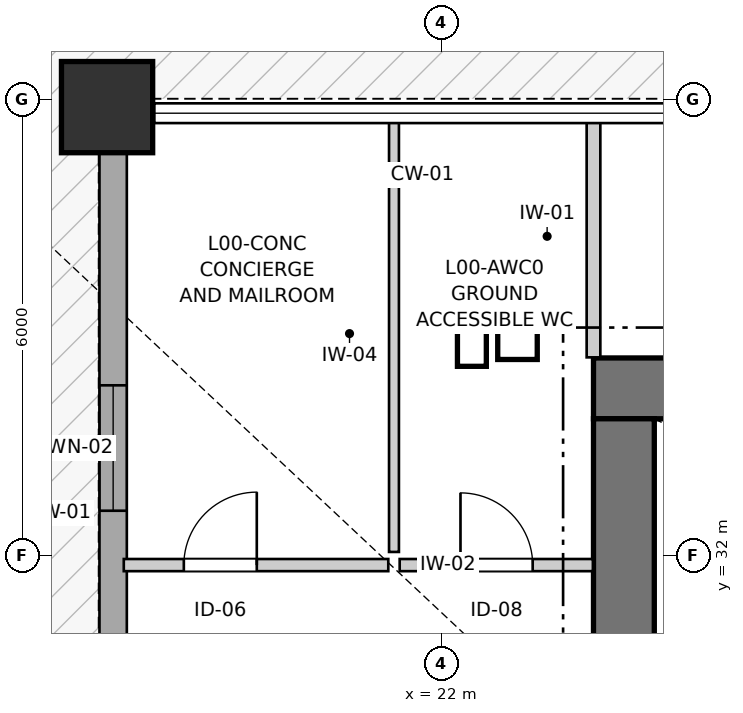
"""IFC4 building model, lengths in metres.
Left out: names, types, materials, properties, quantities, classifications, styles, units other than length and angle.
Written with IfcOpenShell. Run it as: python <this file> out.ifc"""

import sys

from ifc_helpers import new_model, si_unit, direction, frame, frame_2d, origin, origin_2d, place, context, subcontext, project, spatial, rectangle, extrude, source, transform, mapped, element, fill, save


model = new_model("IFC4")
c1 = context("Model", 3, precision=1e-05, world=origin(), true_north=direction((0.0, 1.0)))
c2 = subcontext(c1, "Body", "Model", "MODEL_VIEW")
j1 = project(units=[si_unit("LENGTHUNIT", "METRE"), si_unit("PLANEANGLEUNIT", "RADIAN")], contexts=[c1])
p1 = place(None, origin())
s1 = spatial("IfcSite", under=j1, at=p1, CompositionType="ELEMENT")
p2 = place(p1, origin())
s2 = spatial("IfcBuilding", under=s1, at=p2, CompositionType="ELEMENT")
p3 = place(p2, origin())
s3 = spatial("IfcBuildingStorey", under=s2, at=p3, CompositionType="ELEMENT", Elevation=0.0)
m1 = source(origin(), c2, "Body", "SweptSolid", [
    extrude(rectangle(XDim=1.2, YDim=1.2, at=origin_2d()), origin(), (0.0, 0.0, 1.0), 7.54),
])
p4 = place(p3, frame((17.6, 37.9, 0.0), z_axis=(0.0, 0.0, 1.0), x_axis=(1.0, 0.0, 0.0)))
e1 = element("IfcColumn", 1, at=p4, inside=s3, PredefinedType="COLUMN", context=c2, shape_type="MappedRepresentation", body=[
    mapped(m1, transform((0.0, 0.0, 0.0), x_axis=(1.0, 0.0, 0.0), y_axis=(0.0, 1.0, 0.0), z_axis=(0.0, 0.0, 1.0), scale=1.0)),
])
p5 = place(p3, frame((36.7, 34.2, 0.0), z_axis=(0.0, 0.0, 1.0), x_axis=(-1.0, 0.0, 0.0)))
e2 = element("IfcWall", 2, at=p5, inside=s3, PredefinedType="SHEAR", context=c2, shape_type="SweptSolid", body=[
    extrude(rectangle(XDim=12.7, YDim=0.8, at=frame_2d((6.35, 0.0))), origin(), (0.0, 0.0, 1.0), 7.54),
])
p6 = place(p5, frame((4.72, 0.0, 0.0)))
e3 = element("IfcOpeningElement", 3, at=p6, cuts=e2, PredefinedType="OPENING", context=c2, shape_type="SweptSolid", body=[
    extrude(rectangle(XDim=0.98, YDim=2.15, at=frame_2d((0.49, 1.075))), frame((0.0, 0.41, 0.0), z_axis=(0.0, -1.0, 0.0), x_axis=(1.0, 0.0, 0.0)), (0.0, 0.0, 1.0), 0.82),
])
p7 = place(p3, frame((24.4, 33.8, 0.0), z_axis=(0.0, 0.0, 1.0), x_axis=(0.0, -1.0, 0.0)))
e4 = element("IfcWall", 4, at=p7, inside=s3, PredefinedType="SHEAR", context=c2, shape_type="SweptSolid", body=[
    extrude(rectangle(XDim=15.6, YDim=0.8, at=frame_2d((7.8, 0.0))), origin(), (0.0, 0.0, 1.0), 7.54),
])
p8 = place(p7, frame((7.05, 0.0, 0.0)))
e5 = element("IfcOpeningElement", 5, at=p8, cuts=e4, PredefinedType="OPENING", context=c2, shape_type="SweptSolid", body=[
    extrude(rectangle(XDim=1.5, YDim=2.15, at=frame_2d((0.75, 1.075))), frame((0.0, 0.41, 0.0), z_axis=(0.0, -1.0, 0.0), x_axis=(1.0, 0.0, 0.0)), (0.0, 0.0, 1.0), 0.82),
])
p9 = place(p7, frame((3.52, 0.0, 0.0)))
e6 = element("IfcOpeningElement", 6, at=p9, cuts=e4, PredefinedType="OPENING", context=c2, shape_type="SweptSolid", body=[
    extrude(rectangle(XDim=0.86, YDim=2.05, at=frame_2d((0.43, 1.025))), frame((0.0, 0.41, 0.0), z_axis=(0.0, -1.0, 0.0), x_axis=(1.0, 0.0, 0.0)), (0.0, 0.0, 1.0), 0.82),
])
p10 = place(p7, frame((11.22, 0.0, 0.0)))
e7 = element("IfcOpeningElement", 7, at=p10, cuts=e4, PredefinedType="OPENING", context=c2, shape_type="SweptSolid", body=[
    extrude(rectangle(XDim=0.86, YDim=2.05, at=frame_2d((0.43, 1.025))), frame((0.0, 0.41, 0.0), z_axis=(0.0, -1.0, 0.0), x_axis=(1.0, 0.0, 0.0)), (0.0, 0.0, 1.0), 0.82),
])
p11 = place(p3, frame((17.68, 27.79, 0.0), z_axis=(0.0, 0.0, 1.0), x_axis=(0.0, 1.0, 0.0)))
e8 = element("IfcWall", 8, at=p11, inside=s3, PredefinedType="SOLIDWALL", context=c2, shape_type="SweptSolid", body=[
    extrude(rectangle(XDim=9.53, YDim=0.36, at=frame_2d((4.765, 0.0))), origin(), (0.0, 0.0, 1.0), 6.02),
])
p12 = place(p11, frame((4.8, 0.0, 1.0)))
e9 = element("IfcOpeningElement", 9, at=p12, cuts=e8, PredefinedType="OPENING", context=c2, shape_type="SweptSolid", body=[
    extrude(rectangle(XDim=1.65, YDim=1.45, at=frame_2d((0.825, 0.725))), frame((0.0, 0.19, 0.0), z_axis=(0.0, -1.0, 0.0), x_axis=(1.0, 0.0, 0.0)), (0.0, 0.0, 1.0), 0.38),
])
p13 = place(p3, frame((24.0, 34.608, 0.0), z_axis=(0.0, 0.0, 1.0), x_axis=(0.0, 1.0, 0.0)))
e10 = element("IfcWall", 10, at=p13, inside=s3, PredefinedType="PARTITIONING", context=c2, shape_type="SweptSolid", body=[
    extrude(rectangle(XDim=3.185, YDim=0.18, at=frame_2d((1.593, 0.0))), origin(), (0.0, 0.0, 1.0), 7.54),
])
p14 = place(p3, frame((17.82, 31.875, 0.0), z_axis=(0.0, 0.0, 1.0), x_axis=(1.0, 0.0, 0.0)))
e11 = element("IfcWall", 11, at=p14, inside=s3, PredefinedType="PARTITIONING", context=c2, shape_type="SweptSolid", body=[
    extrude(rectangle(XDim=3.48, YDim=0.16, at=frame_2d((1.74, 0.0))), origin(), (0.0, 0.0, 1.0), 7.54),
])
p15 = place(p14, frame((0.79, 0.0, 0.0)))
e12 = element("IfcOpeningElement", 12, at=p15, cuts=e11, PredefinedType="OPENING", context=c2, shape_type="SweptSolid", body=[
    extrude(rectangle(XDim=0.96, YDim=2.1, at=frame_2d((0.48, 1.05))), frame((0.0, 0.09, 0.0), z_axis=(0.0, -1.0, 0.0), x_axis=(1.0, 0.0, 0.0)), (0.0, 0.0, 1.0), 0.18),
])
p16 = place(p3, frame((21.45, 31.875, 0.0), z_axis=(0.0, 0.0, 1.0), x_axis=(1.0, 0.0, 0.0)))
e13 = element("IfcWall", 13, at=p16, inside=s3, PredefinedType="PARTITIONING", context=c2, shape_type="SweptSolid", body=[
    extrude(rectangle(XDim=2.542, YDim=0.16, at=frame_2d((1.271, 0.0))), origin(), (0.0, 0.0, 1.0), 7.54),
])
p17 = place(p16, frame((0.8, 0.0, 0.0)))
e14 = element("IfcOpeningElement", 14, at=p17, cuts=e13, PredefinedType="OPENING", context=c2, shape_type="SweptSolid", body=[
    extrude(rectangle(XDim=0.95, YDim=2.1, at=frame_2d((0.475, 1.05))), frame((0.0, 0.09, 0.0), z_axis=(0.0, -1.0, 0.0), x_axis=(1.0, 0.0, 0.0)), (0.0, 0.0, 1.0), 0.18),
])
p18 = place(p3, frame((21.375, 32.048, 0.0), z_axis=(0.0, 0.0, 1.0), x_axis=(0.0, 1.0, 0.0)))
e15 = element("IfcWall", 15, at=p18, inside=s3, PredefinedType="PARTITIONING", context=c2, shape_type="SweptSolid", body=[
    extrude(rectangle(XDim=5.745, YDim=0.13, at=frame_2d((2.873, 0.0))), origin(), (0.0, 0.0, 1.0), 7.54),
])
m2 = source(origin(), c2, "Body", "SweptSolid", [
    extrude(rectangle(XDim=1.65, YDim=1.45, at=frame_2d((0.825, 0.725))), frame((0.0, 0.03, 0.0), z_axis=(0.0, -1.0, 0.0), x_axis=(1.0, 0.0, 0.0)), (0.0, 0.0, 1.0), 0.06),
])
p19 = place(p12, origin())
e16 = element("IfcWindow", 16, at=p19, inside=s3, PartitioningType="SINGLE_PANEL", PredefinedType="WINDOW", context=c2, shape_type="MappedRepresentation", body=[
    mapped(m2, transform((0.0, 0.0, 0.0), x_axis=(1.0, 0.0, 0.0), y_axis=(0.0, 1.0, 0.0), z_axis=(0.0, 0.0, 1.0), scale=1.0)),
])
fill(e9, e16)
m3 = source(origin(), c2, "Body", "SweptSolid", [
    extrude(rectangle(XDim=0.96, YDim=2.1, at=frame_2d((0.48, 1.05))), frame((0.0, 0.025, 0.0), z_axis=(0.0, -1.0, 0.0), x_axis=(1.0, 0.0, 0.0)), (0.0, 0.0, 1.0), 0.05),
])
p20 = place(p15, origin())
e17 = element("IfcDoor", 17, at=p20, inside=s3, OperationType="SINGLE_SWING_RIGHT", PredefinedType="DOOR", context=c2, shape_type="MappedRepresentation", body=[
    mapped(m3, transform((0.0, 0.0, 0.0), x_axis=(1.0, 0.0, 0.0), y_axis=(0.0, 1.0, 0.0), z_axis=(0.0, 0.0, 1.0), scale=1.0)),
])
fill(e12, e17)
m4 = source(origin(), c2, "Body", "SweptSolid", [
    extrude(rectangle(XDim=0.95, YDim=2.1, at=frame_2d((0.475, 1.05))), frame((0.0, 0.025, 0.0), z_axis=(0.0, -1.0, 0.0), x_axis=(1.0, 0.0, 0.0)), (0.0, 0.0, 1.0), 0.05),
])
p21 = place(p17, origin())
e18 = element("IfcDoor", 18, at=p21, inside=s3, OperationType="SINGLE_SWING_LEFT", PredefinedType="DOOR", context=c2, shape_type="MappedRepresentation", body=[
    mapped(m4, transform((0.0, 0.0, 0.0), x_axis=(1.0, 0.0, 0.0), y_axis=(0.0, 1.0, 0.0), z_axis=(0.0, 0.0, 1.0), scale=1.0)),
])
fill(e14, e18)
save(model, sys.argv[1])
